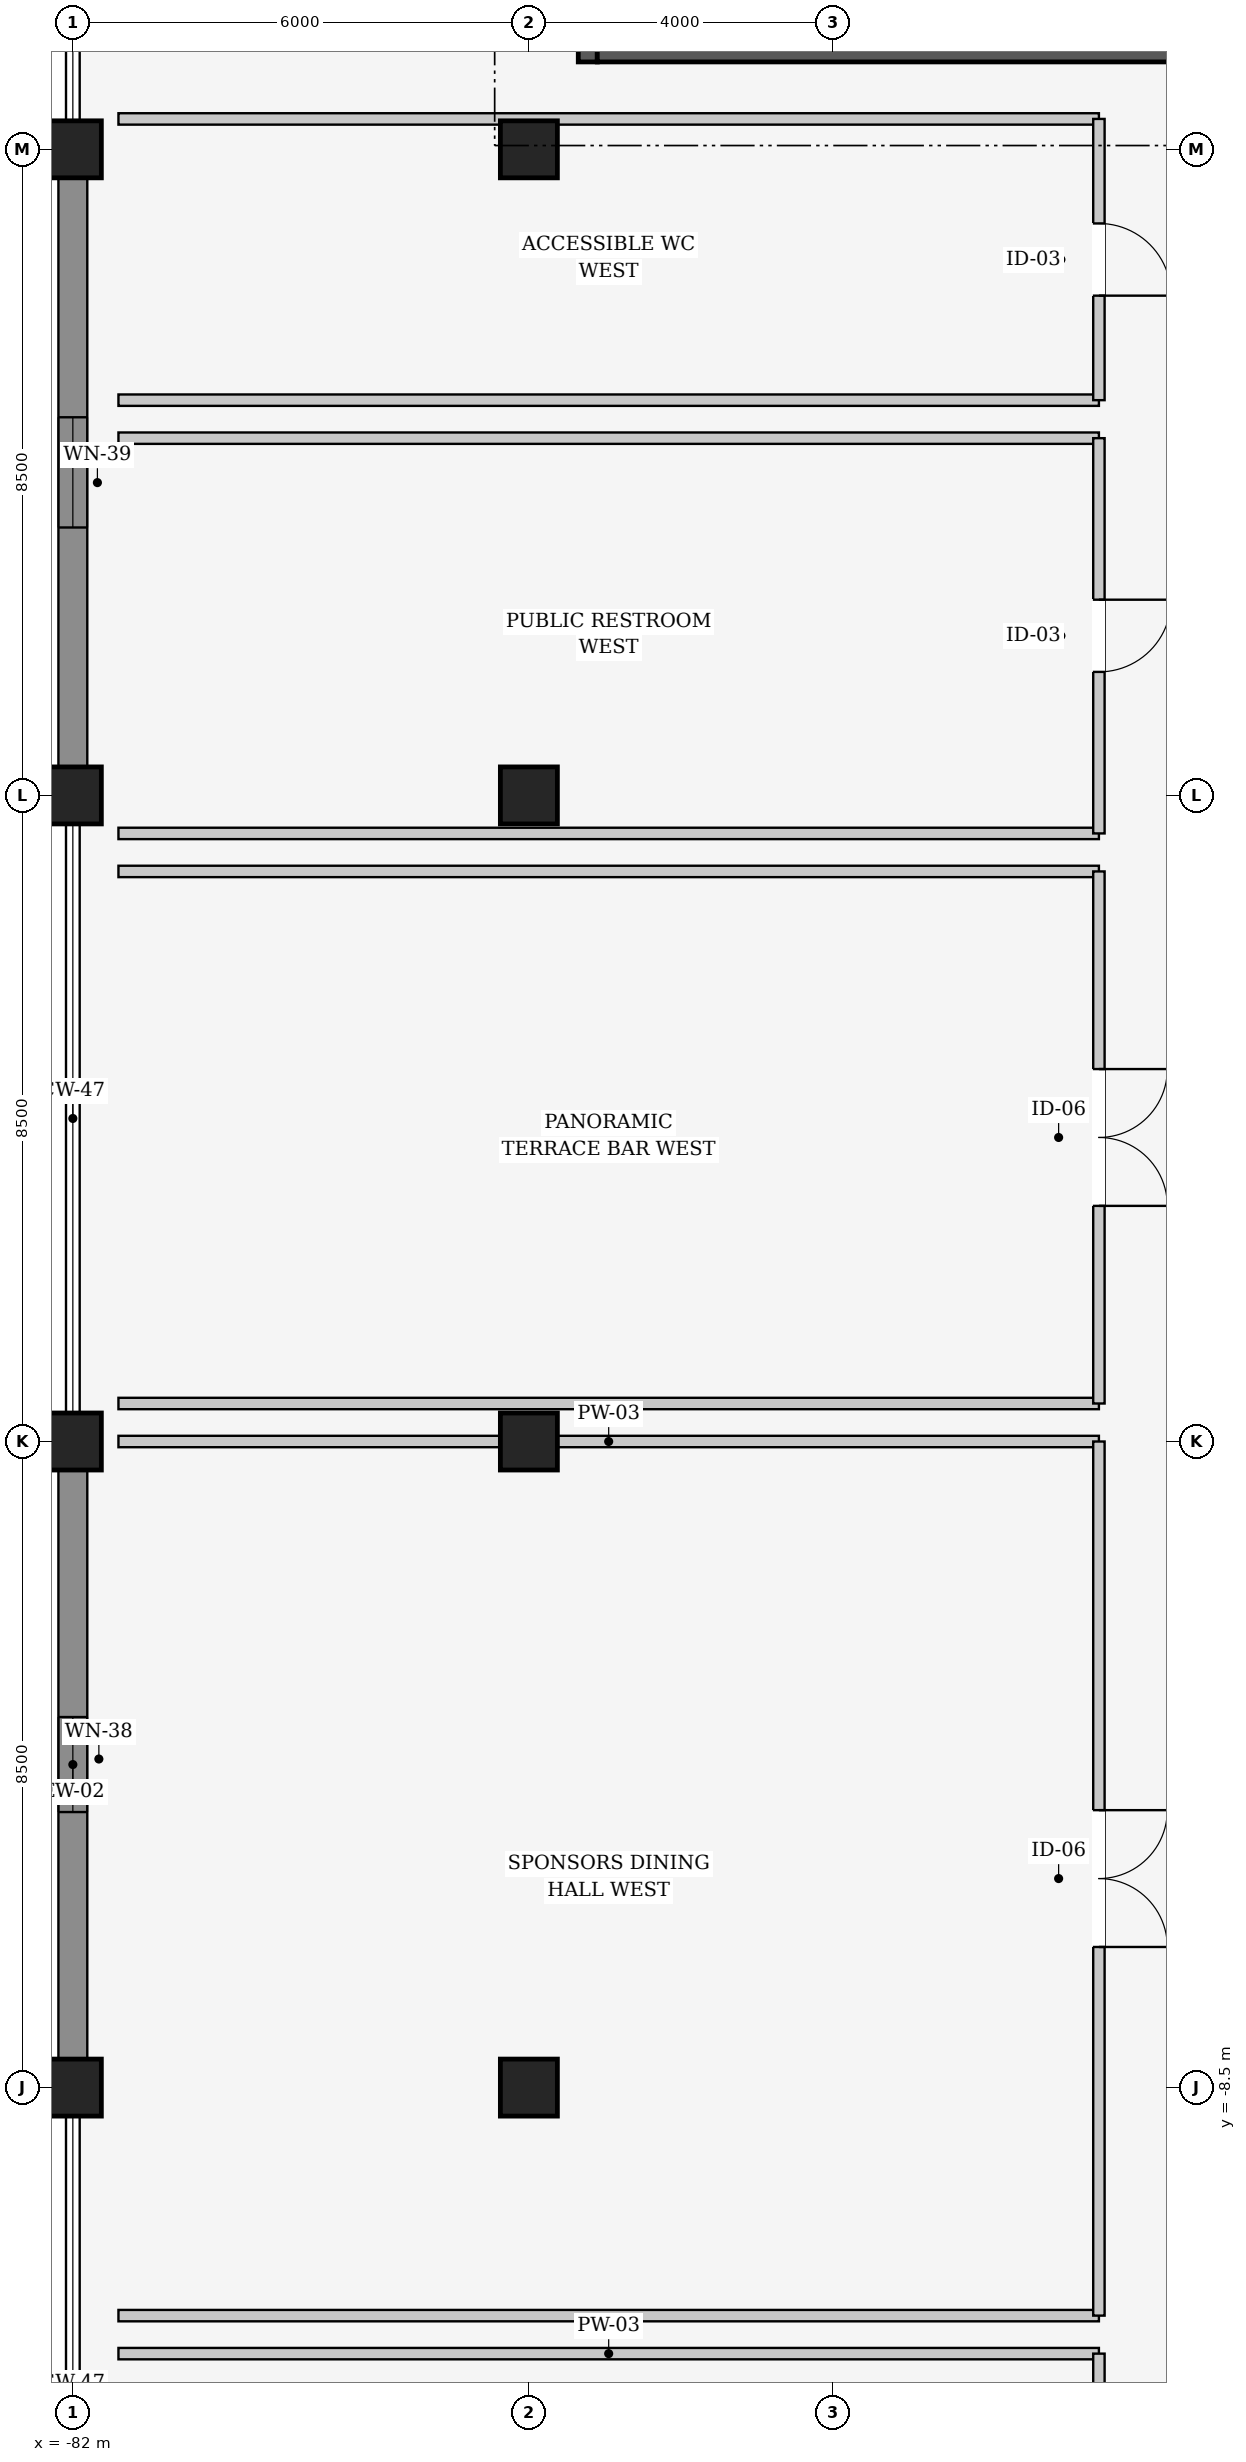
"""IFC4 building model, lengths in metres.
Left out: names, types, materials, properties, quantities, classifications, styles, units other than length and angle.
Written with IfcOpenShell. Run it as: python <this file> out.ifc"""

import sys

from ifc_helpers import new_model, si_unit, direction, frame, frame_2d, origin, origin_2d, place, context, subcontext, project, spatial, rectangle, extrude, element, fill, save


model = new_model("IFC4")
c1 = context("Model", 3, precision=1e-05, world=origin(), true_north=direction((0.0, 1.0)))
c2 = subcontext(c1, "Body", "Model", "MODEL_VIEW")
j1 = project(units=[si_unit("LENGTHUNIT", "METRE"), si_unit("PLANEANGLEUNIT", "RADIAN")], contexts=[c1])
p1 = place(None, origin())
s1 = spatial("IfcSite", under=j1, at=p1, CompositionType="ELEMENT")
p2 = place(p1, origin())
s2 = spatial("IfcBuilding", under=s1, at=p2, CompositionType="ELEMENT")
p3 = place(p2, frame((0.0, 0.0, 21.0)))
s3 = spatial("IfcBuildingStorey", under=s2, at=p3, CompositionType="ELEMENT", Elevation=21.0)
for number, where, z_axis, x_axis in (
    (1, (-82.0, -8.5, 0.0), (0.0, 0.0, 1.0), (1.0, 0.0, 0.0)),
    (2, (-82.0, 0.0, 0.0), (0.0, 0.0, 1.0), (1.0, 0.0, 0.0)),
    (3, (-82.0, 8.5, 0.0), (0.0, 0.0, 1.0), (1.0, 0.0, 0.0)),
    (4, (-82.0, 17.0, 0.0), (0.0, 0.0, 1.0), (1.0, 0.0, 0.0)),
    (5, (-76.0, -8.5, 0.0), (0.0, 0.0, 1.0), (1.0, 0.0, 0.0)),
    (6, (-76.0, 0.0, 0.0), (0.0, 0.0, 1.0), (1.0, 0.0, 0.0)),
    (7, (-76.0, 8.5, 0.0), (0.0, 0.0, 1.0), (1.0, 0.0, 0.0)),
    (8, (-76.0, 17.0, 0.0), (0.0, 0.0, 1.0), (1.0, 0.0, 0.0)),
):
    element("IfcColumn", number, at=place(p3, frame(where, z_axis=z_axis, x_axis=x_axis)), inside=s3, PredefinedType="COLUMN", context=c2, shape_type="SweptSolid", body=[
        extrude(rectangle(XDim=0.75, YDim=0.75, at=origin_2d()), origin(), (0.0, 0.0, 1.0), 5.4),
    ])
p4 = place(p3, frame((-82.0, -8.143, 0.0), z_axis=(0.0, 0.0, 1.0), x_axis=(0.0, 1.0, 0.0)))
e9 = element("IfcWall", 9, at=p4, inside=s3, PredefinedType="SOLIDWALL", context=c2, shape_type="SweptSolid", body=[
    extrude(rectangle(XDim=7.786, YDim=0.38, at=frame_2d((3.893, 0.0))), origin(), (0.0, 0.0, 1.0), 4.36),
])
p5 = place(p4, frame((3.268, 0.0, 0.9)))
e10 = element("IfcOpeningElement", 10, at=p5, cuts=e9, PredefinedType="OPENING", context=c2, shape_type="SweptSolid", body=[
    extrude(rectangle(XDim=1.25, YDim=2.25, at=frame_2d((0.625, 1.125))), frame((0.0, 0.2, 0.0), z_axis=(0.0, -1.0, 0.0), x_axis=(1.0, 0.0, 0.0)), (0.0, 0.0, 1.0), 0.4),
])
p6 = place(p3, frame((-82.0, 8.857, 0.0), z_axis=(0.0, 0.0, 1.0), x_axis=(0.0, 1.0, 0.0)))
e11 = element("IfcWall", 11, at=p6, inside=s3, PredefinedType="SOLIDWALL", context=c2, shape_type="SweptSolid", body=[
    extrude(rectangle(XDim=7.786, YDim=0.38, at=frame_2d((3.893, 0.0))), origin(), (0.0, 0.0, 1.0), 4.36),
])
p7 = place(p6, frame((3.168, 0.0, 0.9)))
e12 = element("IfcOpeningElement", 12, at=p7, cuts=e11, PredefinedType="OPENING", context=c2, shape_type="SweptSolid", body=[
    extrude(rectangle(XDim=1.45, YDim=2.25, at=frame_2d((0.725, 1.125))), frame((0.0, 0.2, 0.0), z_axis=(0.0, -1.0, 0.0), x_axis=(1.0, 0.0, 0.0)), (0.0, 0.0, 1.0), 0.4),
])
p8 = place(p3, frame((-75.225, 18.15, 0.0), z_axis=(0.0, 0.0, 1.0), x_axis=(0.0, 1.0, 0.0)))
e13 = element("IfcWall", 13, at=p8, inside=s3, PredefinedType="SHEAR", context=c2, shape_type="SweptSolid", body=[
    extrude(rectangle(XDim=5.7, YDim=0.25, at=frame_2d((2.85, 0.0))), origin(), (0.0, 0.0, 1.0), 5.4),
])
p9 = place(p3, frame((-64.9, 18.275, 0.0), z_axis=(0.0, 0.0, 1.0), x_axis=(-1.0, 0.0, 0.0)))
e14 = element("IfcWall", 14, at=p9, inside=s3, PredefinedType="SHEAR", context=c2, shape_type="SweptSolid", body=[
    extrude(rectangle(XDim=10.2, YDim=0.25, at=frame_2d((5.1, 0.0))), origin(), (0.0, 0.0, 1.0), 5.4),
])
p10 = place(p3, frame((-81.4, -12.0, 0.0), z_axis=(0.0, 0.0, 1.0), x_axis=(1.0, 0.0, 0.0)))
e15 = element("IfcWall", 15, at=p10, inside=s3, PredefinedType="PARTITIONING", context=c2, shape_type="SweptSolid", body=[
    extrude(rectangle(XDim=12.9, YDim=0.15, at=frame_2d((6.45, 0.0))), origin(), (0.0, 0.0, 1.0), 4.445),
])
p11 = place(p3, frame((-68.5, -12.0, 0.0), z_axis=(0.0, 0.0, 1.0), x_axis=(0.0, -1.0, 0.0)))
e16 = element("IfcWall", 16, at=p11, inside=s3, PredefinedType="PARTITIONING", context=c2, shape_type="SweptSolid", body=[
    extrude(rectangle(XDim=12.4, YDim=0.15, at=frame_2d((6.2, 0.0))), origin(), (0.0, 0.0, 1.0), 4.145),
])
p12 = place(p11, frame((5.3, 0.0, 0.0)))
e17 = element("IfcOpeningElement", 17, at=p12, cuts=e16, PredefinedType="OPENING", context=c2, shape_type="SweptSolid", body=[
    extrude(rectangle(XDim=1.8, YDim=2.2, at=frame_2d((0.9, 1.1))), frame((0.0, 0.085, 0.0), z_axis=(0.0, -1.0, 0.0), x_axis=(1.0, 0.0, 0.0)), (0.0, 0.0, 1.0), 0.17),
])
p13 = place(p3, frame((-81.4, 0.0, 0.0), z_axis=(0.0, 0.0, 1.0), x_axis=(1.0, 0.0, 0.0)))
e18 = element("IfcWall", 18, at=p13, inside=s3, PredefinedType="PARTITIONING", context=c2, shape_type="SweptSolid", body=[
    extrude(rectangle(XDim=12.9, YDim=0.15, at=frame_2d((6.45, 0.0))), origin(), (0.0, 0.0, 1.0), 4.145),
])
p14 = place(p3, frame((-68.5, -11.5, 0.0), z_axis=(0.0, 0.0, 1.0), x_axis=(-1.0, 0.0, 0.0)))
e19 = element("IfcWall", 19, at=p14, inside=s3, PredefinedType="PARTITIONING", context=c2, shape_type="SweptSolid", body=[
    extrude(rectangle(XDim=12.9, YDim=0.15, at=frame_2d((6.45, 0.0))), origin(), (0.0, 0.0, 1.0), 4.445),
])
p15 = place(p3, frame((-68.5, 0.0, 0.0), z_axis=(0.0, 0.0, 1.0), x_axis=(0.0, -1.0, 0.0)))
e20 = element("IfcWall", 20, at=p15, inside=s3, PredefinedType="PARTITIONING", context=c2, shape_type="SweptSolid", body=[
    extrude(rectangle(XDim=11.5, YDim=0.15, at=frame_2d((5.75, 0.0))), origin(), (0.0, 0.0, 1.0), 4.145),
])
p16 = place(p15, frame((4.85, 0.0, 0.0)))
e21 = element("IfcOpeningElement", 21, at=p16, cuts=e20, PredefinedType="OPENING", context=c2, shape_type="SweptSolid", body=[
    extrude(rectangle(XDim=1.8, YDim=2.2, at=frame_2d((0.9, 1.1))), frame((0.0, 0.085, 0.0), z_axis=(0.0, -1.0, 0.0), x_axis=(1.0, 0.0, 0.0)), (0.0, 0.0, 1.0), 0.17),
])
p17 = place(p3, frame((-81.4, 7.5, 0.0), z_axis=(0.0, 0.0, 1.0), x_axis=(1.0, 0.0, 0.0)))
e22 = element("IfcWall", 22, at=p17, inside=s3, PredefinedType="PARTITIONING", context=c2, shape_type="SweptSolid", body=[
    extrude(rectangle(XDim=12.9, YDim=0.15, at=frame_2d((6.45, 0.0))), origin(), (0.0, 0.0, 1.0), 4.445),
])
p18 = place(p3, frame((-68.5, 0.5, 0.0), z_axis=(0.0, 0.0, 1.0), x_axis=(-1.0, 0.0, 0.0)))
e23 = element("IfcWall", 23, at=p18, inside=s3, PredefinedType="PARTITIONING", context=c2, shape_type="SweptSolid", body=[
    extrude(rectangle(XDim=12.9, YDim=0.15, at=frame_2d((6.45, 0.0))), origin(), (0.0, 0.0, 1.0), 4.145),
])
p19 = place(p3, frame((-68.5, 7.5, 0.0), z_axis=(0.0, 0.0, 1.0), x_axis=(0.0, -1.0, 0.0)))
e24 = element("IfcWall", 24, at=p19, inside=s3, PredefinedType="PARTITIONING", context=c2, shape_type="SweptSolid", body=[
    extrude(rectangle(XDim=7.0, YDim=0.15, at=frame_2d((3.5, 0.0))), origin(), (0.0, 0.0, 1.0), 4.145),
])
p20 = place(p19, frame((2.6, 0.0, 0.0)))
e25 = element("IfcOpeningElement", 25, at=p20, cuts=e24, PredefinedType="OPENING", context=c2, shape_type="SweptSolid", body=[
    extrude(rectangle(XDim=1.8, YDim=2.2, at=frame_2d((0.9, 1.1))), frame((0.0, 0.085, 0.0), z_axis=(0.0, -1.0, 0.0), x_axis=(1.0, 0.0, 0.0)), (0.0, 0.0, 1.0), 0.17),
])
p21 = place(p3, frame((-81.4, 13.2, 0.0), z_axis=(0.0, 0.0, 1.0), x_axis=(1.0, 0.0, 0.0)))
e26 = element("IfcWall", 26, at=p21, inside=s3, PredefinedType="PARTITIONING", context=c2, shape_type="SweptSolid", body=[
    extrude(rectangle(XDim=12.9, YDim=0.15, at=frame_2d((6.45, 0.0))), origin(), (0.0, 0.0, 1.0), 4.445),
])
p22 = place(p3, frame((-68.5, 8.0, 0.0), z_axis=(0.0, 0.0, 1.0), x_axis=(-1.0, 0.0, 0.0)))
e27 = element("IfcWall", 27, at=p22, inside=s3, PredefinedType="PARTITIONING", context=c2, shape_type="SweptSolid", body=[
    extrude(rectangle(XDim=12.9, YDim=0.15, at=frame_2d((6.45, 0.0))), origin(), (0.0, 0.0, 1.0), 4.145),
])
p23 = place(p3, frame((-68.5, 13.2, 0.0), z_axis=(0.0, 0.0, 1.0), x_axis=(0.0, -1.0, 0.0)))
e28 = element("IfcWall", 28, at=p23, inside=s3, PredefinedType="PARTITIONING", context=c2, shape_type="SweptSolid", body=[
    extrude(rectangle(XDim=5.2, YDim=0.15, at=frame_2d((2.6, 0.0))), origin(), (0.0, 0.0, 1.0), 4.145),
])
p24 = place(p23, frame((2.125, 0.0, 0.0)))
e29 = element("IfcOpeningElement", 29, at=p24, cuts=e28, PredefinedType="OPENING", context=c2, shape_type="SweptSolid", body=[
    extrude(rectangle(XDim=0.95, YDim=2.15, at=frame_2d((0.475, 1.075))), frame((0.0, 0.085, 0.0), z_axis=(0.0, -1.0, 0.0), x_axis=(1.0, 0.0, 0.0)), (0.0, 0.0, 1.0), 0.17),
])
p25 = place(p3, frame((-81.4, 17.4, 0.0), z_axis=(0.0, 0.0, 1.0), x_axis=(1.0, 0.0, 0.0)))
e30 = element("IfcWall", 30, at=p25, inside=s3, PredefinedType="PARTITIONING", context=c2, shape_type="SweptSolid", body=[
    extrude(rectangle(XDim=12.9, YDim=0.15, at=frame_2d((6.45, 0.0))), origin(), (0.0, 0.0, 1.0), 4.145),
])
p26 = place(p3, frame((-68.5, 13.7, 0.0), z_axis=(0.0, 0.0, 1.0), x_axis=(-1.0, 0.0, 0.0)))
e31 = element("IfcWall", 31, at=p26, inside=s3, PredefinedType="PARTITIONING", context=c2, shape_type="SweptSolid", body=[
    extrude(rectangle(XDim=12.9, YDim=0.15, at=frame_2d((6.45, 0.0))), origin(), (0.0, 0.0, 1.0), 4.445),
])
p27 = place(p3, frame((-68.5, 17.4, 0.0), z_axis=(0.0, 0.0, 1.0), x_axis=(0.0, -1.0, 0.0)))
e32 = element("IfcWall", 32, at=p27, inside=s3, PredefinedType="PARTITIONING", context=c2, shape_type="SweptSolid", body=[
    extrude(rectangle(XDim=3.7, YDim=0.15, at=frame_2d((1.85, 0.0))), origin(), (0.0, 0.0, 1.0), 4.145),
])
p28 = place(p27, frame((1.375, 0.0, 0.0)))
e33 = element("IfcOpeningElement", 33, at=p28, cuts=e32, PredefinedType="OPENING", context=c2, shape_type="SweptSolid", body=[
    extrude(rectangle(XDim=0.95, YDim=2.15, at=frame_2d((0.475, 1.075))), frame((0.0, 0.085, 0.0), z_axis=(0.0, -1.0, 0.0), x_axis=(1.0, 0.0, 0.0)), (0.0, 0.0, 1.0), 0.17),
])
p29 = place(p5, origin())
e34 = element("IfcWindow", 34, at=p29, inside=s3, PartitioningType="SINGLE_PANEL", PredefinedType="WINDOW", context=c2, shape_type="SweptSolid", body=[
    extrude(rectangle(XDim=1.25, YDim=2.25, at=frame_2d((0.625, 1.125))), frame((0.0, 0.03, 0.0), z_axis=(0.0, -1.0, 0.0), x_axis=(1.0, 0.0, 0.0)), (0.0, 0.0, 1.0), 0.06),
])
fill(e10, e34)
p30 = place(p7, origin())
e35 = element("IfcWindow", 35, at=p30, inside=s3, PartitioningType="SINGLE_PANEL", PredefinedType="WINDOW", context=c2, shape_type="SweptSolid", body=[
    extrude(rectangle(XDim=1.45, YDim=2.25, at=frame_2d((0.725, 1.125))), frame((0.0, 0.03, 0.0), z_axis=(0.0, -1.0, 0.0), x_axis=(1.0, 0.0, 0.0)), (0.0, 0.0, 1.0), 0.06),
])
fill(e12, e35)
p31 = place(p16, origin())
e36 = element("IfcDoor", 36, at=p31, inside=s3, OperationType="DOUBLE_DOOR_SINGLE_SWING", PredefinedType="DOOR", context=c2, shape_type="SweptSolid", body=[
    extrude(rectangle(XDim=1.8, YDim=2.2, at=frame_2d((0.9, 1.1))), frame((0.0, 0.025, 0.0), z_axis=(0.0, -1.0, 0.0), x_axis=(1.0, 0.0, 0.0)), (0.0, 0.0, 1.0), 0.05),
])
fill(e21, e36)
p32 = place(p20, origin())
e37 = element("IfcDoor", 37, at=p32, inside=s3, OperationType="DOUBLE_DOOR_SINGLE_SWING", PredefinedType="DOOR", context=c2, shape_type="SweptSolid", body=[
    extrude(rectangle(XDim=1.8, YDim=2.2, at=frame_2d((0.9, 1.1))), frame((0.0, 0.025, 0.0), z_axis=(0.0, -1.0, 0.0), x_axis=(1.0, 0.0, 0.0)), (0.0, 0.0, 1.0), 0.05),
])
fill(e25, e37)
p33 = place(p24, origin())
e38 = element("IfcDoor", 38, at=p33, inside=s3, OperationType="SINGLE_SWING_LEFT", PredefinedType="DOOR", context=c2, shape_type="SweptSolid", body=[
    extrude(rectangle(XDim=0.95, YDim=2.15, at=frame_2d((0.475, 1.075))), frame((0.0, 0.025, 0.0), z_axis=(0.0, -1.0, 0.0), x_axis=(1.0, 0.0, 0.0)), (0.0, 0.0, 1.0), 0.05),
])
fill(e29, e38)
p34 = place(p28, origin())
e39 = element("IfcDoor", 39, at=p34, inside=s3, OperationType="SINGLE_SWING_RIGHT", PredefinedType="DOOR", context=c2, shape_type="SweptSolid", body=[
    extrude(rectangle(XDim=0.95, YDim=2.15, at=frame_2d((0.475, 1.075))), frame((0.0, 0.025, 0.0), z_axis=(0.0, -1.0, 0.0), x_axis=(1.0, 0.0, 0.0)), (0.0, 0.0, 1.0), 0.05),
])
fill(e33, e39)
save(model, sys.argv[1])
